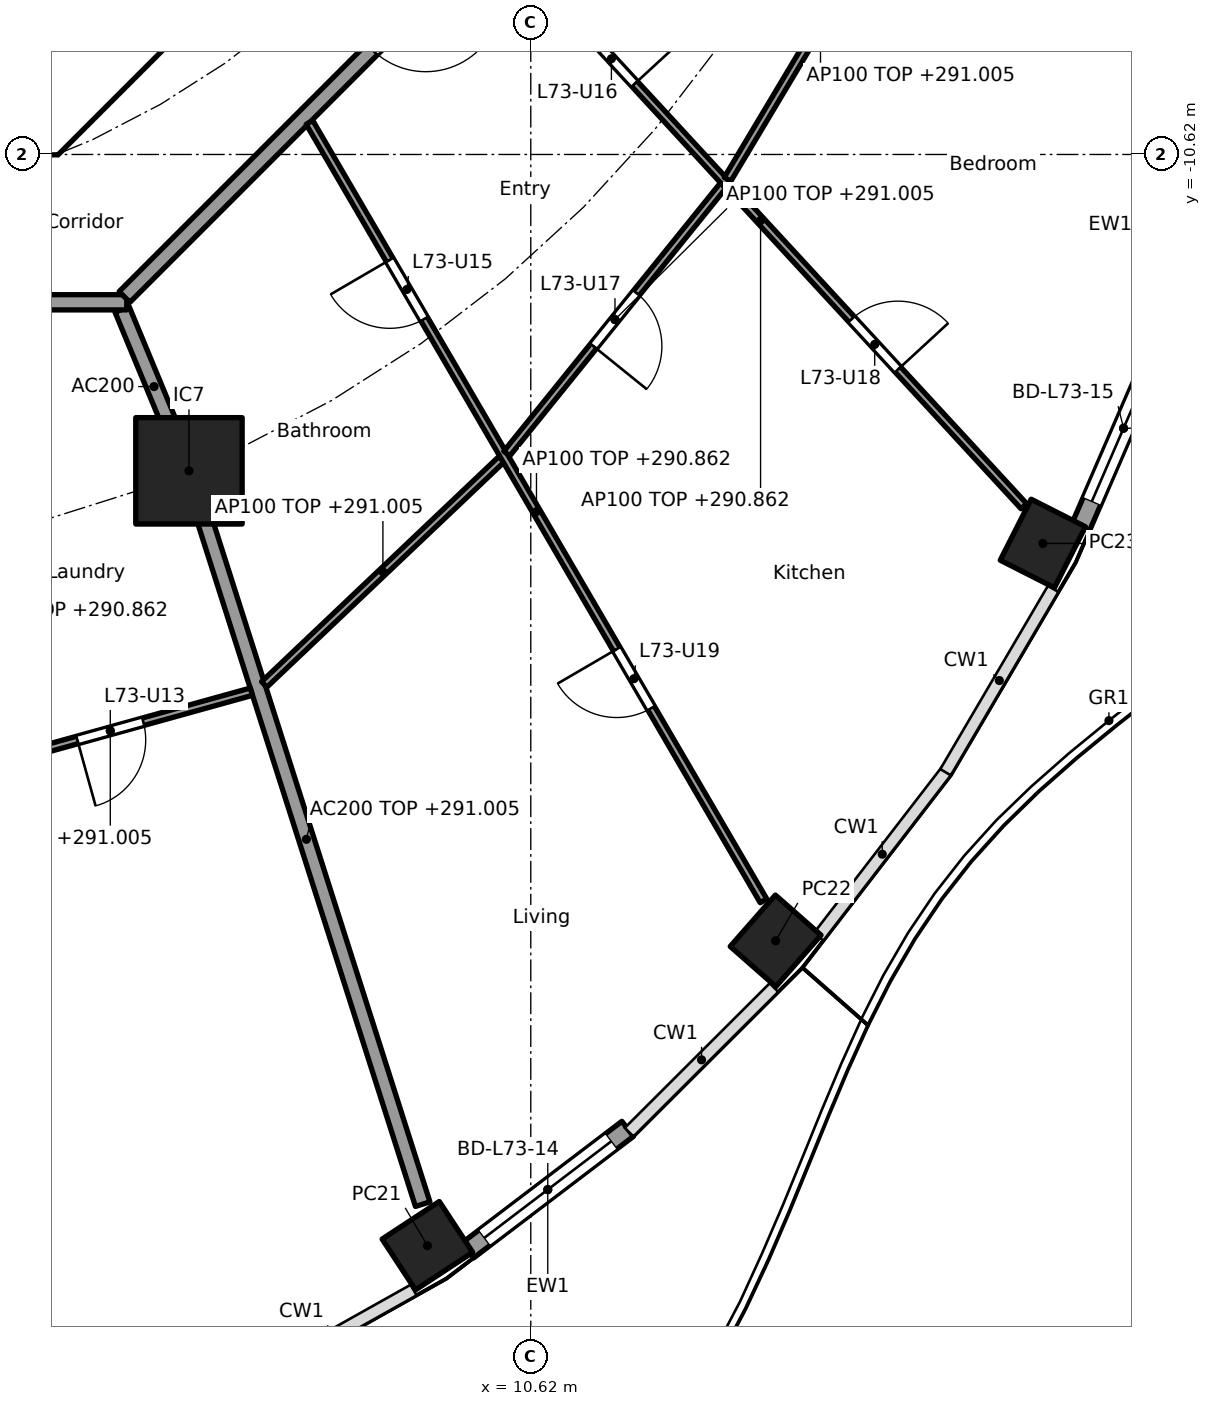
"""IFC4 building model, lengths in metres.
Left out: names, types, materials, properties, quantities, classifications, styles, units other than length and angle.
Written with IfcOpenShell. Run it as: python <this file> out.ifc"""

import sys

from ifc_helpers import new_model, si_unit, direction, frame, frame_2d, origin, origin_2d, place, context, subcontext, project, spatial, polyline, rectangle, hollow_rectangle, outline, extrude, element, fill, save


model = new_model("IFC4")
c1 = context("Model", 3, precision=1e-05, world=origin(), true_north=direction((0.0, 1.0)))
c2 = subcontext(c1, "Body", "Model", "MODEL_VIEW")
j1 = project(units=[si_unit("LENGTHUNIT", "METRE"), si_unit("PLANEANGLEUNIT", "RADIAN")], contexts=[c1])
p1 = place(None, origin())
s1 = spatial("IfcSite", under=j1, at=p1, CompositionType="ELEMENT")
p2 = place(p1, origin())
s2 = spatial("IfcBuilding", under=s1, at=p2, CompositionType="ELEMENT")
p3 = place(p2, frame((0.0, 0.0, 288.1)))
s3 = spatial("IfcBuildingStorey", under=s2, at=p3, CompositionType="ELEMENT", Elevation=288.1)
for number, where, z_axis, x_axis in (
    (1, (9.26, -24.976, 0.0), (0.0, 0.0, 1.0), (0.836, 0.549, 0.0)),
    (2, (13.841, -20.965, 0.0), (0.0, 0.0, 1.0), (0.66, 0.751, 0.0)),
    (3, (17.356, -15.738, 0.0), (0.0, 0.0, 1.0), (0.452, 0.892, 0.0)),
):
    element("IfcColumn", number, at=place(p3, frame(where, z_axis=z_axis, x_axis=x_axis)), inside=s3, PredefinedType="COLUMN", context=c2, shape_type="SweptSolid", body=[
        extrude(hollow_rectangle(XDim=0.9, YDim=0.8, WallThickness=0.028, at=origin_2d()), origin(), (0.0, 0.0, 1.0), 3.7),
    ])
p4 = place(p3, frame((6.123, -14.782, 0.0), z_axis=(0.0, 0.0, 1.0), x_axis=(1.0, 0.0, 0.0)))
e4 = element("IfcColumn", 4, at=p4, inside=s3, PredefinedType="COLUMN", context=c2, shape_type="SweptSolid", body=[
    extrude(rectangle(XDim=1.4, YDim=1.4, at=origin_2d()), origin(), (0.0, 0.0, 1.0), 3.7),
])
p5 = place(p3, frame((11.895, -23.439, 0.0), z_axis=(0.0, 0.0, 1.0), x_axis=(-0.796055284084, -0.605223912847, 0.0)))
e5 = element("IfcWall", 5, at=p5, inside=s3, PredefinedType="SOLIDWALL", context=c2, shape_type="SweptSolid", body=[
    extrude(rectangle(XDim=2.641, YDim=0.25, at=frame_2d((1.32, 0.0))), origin(), (0.0, 0.0, 1.0), 3.44),
])
p6 = place(p5, frame((0.27, 0.0, 0.0)))
e6 = element("IfcOpeningElement", 6, at=p6, cuts=e5, PredefinedType="OPENING", context=c2, shape_type="SweptSolid", body=[
    extrude(rectangle(XDim=2.1, YDim=2.4, at=frame_2d((1.05, 1.2))), frame((0.0, 0.135, 0.0), z_axis=(0.0, -1.0, 0.0), x_axis=(1.0, 0.0, 0.0)), (0.0, 0.0, 1.0), 0.27),
])
p7 = place(p3, frame((18.983, -12.918, 0.0), z_axis=(0.0, 0.0, 1.0), x_axis=(-0.397597791596, -0.9175598052, 0.0)))
e7 = element("IfcWall", 7, at=p7, inside=s3, PredefinedType="SOLIDWALL", context=c2, shape_type="SweptSolid", body=[
    extrude(rectangle(XDim=2.841, YDim=0.25, at=frame_2d((1.42, 0.0))), origin(), (0.0, 0.0, 1.0), 3.44),
])
p8 = place(p7, frame((0.371, 0.0, 0.0)))
e8 = element("IfcOpeningElement", 8, at=p8, cuts=e7, PredefinedType="OPENING", context=c2, shape_type="SweptSolid", body=[
    extrude(rectangle(XDim=2.1, YDim=2.4, at=frame_2d((1.05, 1.2))), frame((0.0, 0.135, 0.0), z_axis=(0.0, -1.0, 0.0), x_axis=(1.0, 0.0, 0.0)), (0.0, 0.0, 1.0), 0.27),
])
p9 = place(p3, frame((4.613, -9.988, 0.0), z_axis=(0.0, 0.0, 1.0), x_axis=(0.707106781187, 0.707106781187, 0.0)))
e9 = element("IfcWall", 9, at=p9, inside=s3, PredefinedType="SHEAR", context=c2, shape_type="SweptSolid", body=[
    extrude(rectangle(XDim=7.602, YDim=0.6, at=frame_2d((3.801, 0.0))), origin(), (0.0, 0.0, 1.0), 3.44),
])
p10 = place(p9, frame((3.201, 0.0, 0.0)))
e10 = element("IfcOpeningElement", 10, at=p10, cuts=e9, PredefinedType="OPENING", context=c2, shape_type="SweptSolid", body=[
    extrude(rectangle(XDim=1.2, YDim=2.1, at=frame_2d((0.6, 1.05))), frame((0.0, 0.31, 0.0), z_axis=(0.0, -1.0, 0.0), x_axis=(1.0, 0.0, 0.0)), (0.0, 0.0, 1.0), 0.62),
])
p11 = place(p3, origin())
e11 = element("IfcWall", 11, at=p11, inside=s3, PredefinedType="SHEAR", context=c2, shape_type="SweptSolid", body=[
    extrude(outline(polyline([(-4.152, -10.025), (4.152, -10.025), (4.401, -9.776), (4.825, -10.2), (4.401, -10.625), (-4.401, -10.625), (-4.825, -10.2), (-4.401, -9.776), (-4.152, -10.025)])), origin(), (0.0, 0.0, 1.0), 3.44),
])
p12 = place(p3, frame((5.243, -12.657, 0.0), z_axis=(0.0, 0.0, 1.0), x_axis=(0.382707856524, -0.923869415315, 0.0)))
e12 = element("IfcWall", 12, at=p12, inside=s3, PredefinedType="PARTITIONING", context=c2, shape_type="SweptSolid", body=[
    extrude(rectangle(XDim=2.2, YDim=0.2, at=frame_2d((1.1, 0.0))), origin(), (0.0, 0.0, 1.0), 3.44),
])
p13 = place(p3, frame((6.138, -14.83, 0.0), z_axis=(0.0, 0.0, 1.0), x_axis=(0.303653679037, -0.952782474234, 0.0)))
e13 = element("IfcWall", 13, at=p13, inside=s3, PredefinedType="PARTITIONING", context=c2, shape_type="SweptSolid", body=[
    extrude(rectangle(XDim=10.076, YDim=0.2, at=frame_2d((5.038, 0.0))), origin(), (0.0, 0.0, 1.0), 2.905),
])
p14 = place(p3, frame((14.823, -6.151, 0.0), z_axis=(0.0, 0.0, 1.0), x_axis=(0.821435065081, -0.570302054928, 0.0)))
e14 = element("IfcWall", 14, at=p14, inside=s3, PredefinedType="PARTITIONING", context=c2, shape_type="SweptSolid", body=[
    extrude(rectangle(XDim=5.368, YDim=0.2, at=frame_2d((2.684, 0.0))), origin(), (0.0, 0.0, 1.0), 3.44),
])
p15 = place(p3, frame((-5.104, -12.565, 0.0), z_axis=(0.0, 0.0, 1.0), x_axis=(1.0, 0.0, 0.0)))
e15 = element("IfcWall", 15, at=p15, inside=s3, PredefinedType="PARTITIONING", context=c2, shape_type="SweptSolid", body=[
    extrude(rectangle(XDim=10.409, YDim=0.2, at=frame_2d((5.205, 0.0))), origin(), (0.0, 0.0, 1.0), 3.44),
])
p16 = place(p15, frame((3.303, 0.0, 0.0)))
e16 = element("IfcOpeningElement", 16, at=p16, cuts=e15, PredefinedType="OPENING", context=c2, shape_type="SweptSolid", body=[
    extrude(rectangle(XDim=1.0, YDim=2.1, at=frame_2d((0.5, 1.05))), frame((0.0, 0.11, 0.0), z_axis=(0.0, -1.0, 0.0), x_axis=(1.0, 0.0, 0.0)), (0.0, 0.0, 1.0), 0.22),
])
p17 = place(p3, frame((5.275, -12.494, 0.0), z_axis=(0.0, 0.0, 1.0), x_axis=(0.707106781187, 0.707106781187, 0.0)))
e17 = element("IfcWall", 17, at=p17, inside=s3, PredefinedType="PARTITIONING", context=c2, shape_type="SweptSolid", body=[
    extrude(rectangle(XDim=10.409, YDim=0.2, at=frame_2d((5.205, 0.0))), origin(), (0.0, 0.0, 1.0), 3.44),
])
p18 = place(p17, frame((4.604, 0.0, 0.0)))
e18 = element("IfcOpeningElement", 18, at=p18, cuts=e17, PredefinedType="OPENING", context=c2, shape_type="SweptSolid", body=[
    extrude(rectangle(XDim=1.0, YDim=2.1, at=frame_2d((0.5, 1.05))), frame((0.0, 0.11, 0.0), z_axis=(0.0, -1.0, 0.0), x_axis=(1.0, 0.0, 0.0)), (0.0, 0.0, 1.0), 0.22),
])
p19 = place(p3, frame((3.231, -18.718, 0.0), z_axis=(0.0, 0.0, 1.0), x_axis=(0.963606817151, 0.267323590318, 0.0)))
e19 = element("IfcWall", 19, at=p19, inside=s3, PredefinedType="PARTITIONING", context=c2, shape_type="SweptSolid", body=[
    extrude(rectangle(XDim=3.853, YDim=0.1, at=frame_2d((1.927, 0.0))), origin(), (0.0, 0.0, 1.0), 2.905),
])
p20 = place(p19, frame((1.477, 0.0, 0.0)))
e20 = element("IfcOpeningElement", 20, at=p20, cuts=e19, PredefinedType="OPENING", context=c2, shape_type="SweptSolid", body=[
    extrude(rectangle(XDim=0.9, YDim=2.1, at=frame_2d((0.45, 1.05))), frame((0.0, 0.06, 0.0), z_axis=(0.0, -1.0, 0.0), x_axis=(1.0, 0.0, 0.0)), (0.0, 0.0, 1.0), 0.12),
])
p21 = place(p3, frame((7.113, -17.592, 0.0), z_axis=(0.0, 0.0, 1.0), x_axis=(0.725433932329, 0.688291805723, 0.0)))
e21 = element("IfcWall", 21, at=p21, inside=s3, PredefinedType="PARTITIONING", context=c2, shape_type="SweptSolid", body=[
    extrude(rectangle(XDim=4.305, YDim=0.1, at=frame_2d((2.153, 0.0))), origin(), (0.0, 0.0, 1.0), 2.905),
])
p22 = place(p3, frame((7.708, -10.198, 0.0), z_axis=(0.0, 0.0, 1.0), x_axis=(0.503839015963, -0.863797572347, 0.0)))
e22 = element("IfcWall", 22, at=p22, inside=s3, PredefinedType="PARTITIONING", context=c2, shape_type="SweptSolid", body=[
    extrude(rectangle(XDim=11.856, YDim=0.1, at=frame_2d((5.928, 0.0))), origin(), (0.0, 0.0, 1.0), 2.762),
])
p23 = place(p22, frame((2.095, 0.0, 0.0)))
e23 = element("IfcOpeningElement", 23, at=p23, cuts=e22, PredefinedType="OPENING", context=c2, shape_type="SweptSolid", body=[
    extrude(rectangle(XDim=0.9, YDim=2.1, at=frame_2d((0.45, 1.05))), frame((0.0, 0.06, 0.0), z_axis=(0.0, -1.0, 0.0), x_axis=(1.0, 0.0, 0.0)), (0.0, 0.0, 1.0), 0.12),
])
p24 = place(p22, frame((8.023, 0.0, 0.0)))
e24 = element("IfcOpeningElement", 24, at=p24, cuts=e22, PredefinedType="OPENING", context=c2, shape_type="SweptSolid", body=[
    extrude(rectangle(XDim=0.9, YDim=2.1, at=frame_2d((0.45, 1.05))), frame((0.0, 0.06, 0.0), z_axis=(0.0, -1.0, 0.0), x_axis=(1.0, 0.0, 0.0)), (0.0, 0.0, 1.0), 0.12),
])
p25 = place(p3, frame((10.304, -14.555, 0.0), z_axis=(0.0, 0.0, 1.0), x_axis=(0.628170338674, 0.778075848237, 0.0)))
e25 = element("IfcWall", 25, at=p25, inside=s3, PredefinedType="PARTITIONING", context=c2, shape_type="SweptSolid", body=[
    extrude(rectangle(XDim=4.532, YDim=0.1, at=frame_2d((2.266, 0.0))), origin(), (0.0, 0.0, 1.0), 2.905),
])
p26 = place(p25, frame((1.816, 0.0, 0.0)))
e26 = element("IfcOpeningElement", 26, at=p26, cuts=e25, PredefinedType="OPENING", context=c2, shape_type="SweptSolid", body=[
    extrude(rectangle(XDim=0.9, YDim=2.1, at=frame_2d((0.45, 1.05))), frame((0.0, 0.06, 0.0), z_axis=(0.0, -1.0, 0.0), x_axis=(1.0, 0.0, 0.0)), (0.0, 0.0, 1.0), 0.12),
])
p27 = place(p3, frame((10.179, -7.731, 0.0), z_axis=(0.0, 0.0, 1.0), x_axis=(0.67775318564, -0.73528947997, 0.0)))
e27 = element("IfcWall", 27, at=p27, inside=s3, PredefinedType="PARTITIONING", context=c2, shape_type="SweptSolid", body=[
    extrude(rectangle(XDim=10.222, YDim=0.1, at=frame_2d((5.111, 0.0))), origin(), (0.0, 0.0, 1.0), 2.762),
])
p28 = place(p27, frame((1.766, 0.0, 0.0)))
e28 = element("IfcOpeningElement", 28, at=p28, cuts=e27, PredefinedType="OPENING", context=c2, shape_type="SweptSolid", body=[
    extrude(rectangle(XDim=0.9, YDim=2.1, at=frame_2d((0.45, 1.05))), frame((0.0, 0.06, 0.0), z_axis=(0.0, -1.0, 0.0), x_axis=(1.0, 0.0, 0.0)), (0.0, 0.0, 1.0), 0.12),
])
p29 = place(p27, frame((6.877, 0.0, 0.0)))
e29 = element("IfcOpeningElement", 29, at=p29, cuts=e27, PredefinedType="OPENING", context=c2, shape_type="SweptSolid", body=[
    extrude(rectangle(XDim=0.9, YDim=2.1, at=frame_2d((0.45, 1.05))), frame((0.0, 0.06, 0.0), z_axis=(0.0, -1.0, 0.0), x_axis=(1.0, 0.0, 0.0)), (0.0, 0.0, 1.0), 0.12),
])
p30 = place(p3, frame((13.208, -10.947, 0.0), z_axis=(0.0, 0.0, 1.0), x_axis=(0.512726452516, 0.858552028063, 0.0)))
e30 = element("IfcWall", 30, at=p30, inside=s3, PredefinedType="PARTITIONING", context=c2, shape_type="SweptSolid", body=[
    extrude(rectangle(XDim=4.772, YDim=0.1, at=frame_2d((2.386, 0.0))), origin(), (0.0, 0.0, 1.0), 2.905),
])
p31 = place(p6, origin())
e31 = element("IfcDoor", 31, at=p31, inside=s3, OperationType="SLIDING_TO_LEFT", PredefinedType="DOOR", context=c2, shape_type="SweptSolid", body=[
    extrude(rectangle(XDim=2.1, YDim=2.4, at=frame_2d((1.05, 1.2))), frame((0.0, 0.025, 0.0), z_axis=(0.0, -1.0, 0.0), x_axis=(1.0, 0.0, 0.0)), (0.0, 0.0, 1.0), 0.05),
])
fill(e6, e31)
p32 = place(p8, origin())
e32 = element("IfcDoor", 32, at=p32, inside=s3, OperationType="SLIDING_TO_LEFT", PredefinedType="DOOR", context=c2, shape_type="SweptSolid", body=[
    extrude(rectangle(XDim=2.1, YDim=2.4, at=frame_2d((1.05, 1.2))), frame((0.0, 0.025, 0.0), z_axis=(0.0, -1.0, 0.0), x_axis=(1.0, 0.0, 0.0)), (0.0, 0.0, 1.0), 0.05),
])
fill(e8, e32)
p33 = place(p20, frame((0.9, 0.0, 0.0), x_axis=(-1.0, 0.0, 0.0)))
e33 = element("IfcDoor", 33, at=p33, inside=s3, OperationType="SINGLE_SWING_RIGHT", PredefinedType="DOOR", context=c2, shape_type="SweptSolid", body=[
    extrude(rectangle(XDim=0.9, YDim=2.1, at=frame_2d((0.45, 1.05))), frame((0.0, 0.025, 0.0), z_axis=(0.0, -1.0, 0.0), x_axis=(1.0, 0.0, 0.0)), (0.0, 0.0, 1.0), 0.05),
])
fill(e20, e33)
p34 = place(p23, frame((0.9, 0.0, 0.0), x_axis=(-1.0, 0.0, 0.0)))
e34 = element("IfcDoor", 34, at=p34, inside=s3, OperationType="SINGLE_SWING_RIGHT", PredefinedType="DOOR", context=c2, shape_type="SweptSolid", body=[
    extrude(rectangle(XDim=0.9, YDim=2.1, at=frame_2d((0.45, 1.05))), frame((0.0, 0.025, 0.0), z_axis=(0.0, -1.0, 0.0), x_axis=(1.0, 0.0, 0.0)), (0.0, 0.0, 1.0), 0.05),
])
fill(e23, e34)
p35 = place(p28, origin())
e35 = element("IfcDoor", 35, at=p35, inside=s3, OperationType="SINGLE_SWING_RIGHT", PredefinedType="DOOR", context=c2, shape_type="SweptSolid", body=[
    extrude(rectangle(XDim=0.9, YDim=2.1, at=frame_2d((0.45, 1.05))), frame((0.0, 0.025, 0.0), z_axis=(0.0, -1.0, 0.0), x_axis=(1.0, 0.0, 0.0)), (0.0, 0.0, 1.0), 0.05),
])
fill(e28, e35)
p36 = place(p26, frame((0.9, 0.0, 0.0), x_axis=(-1.0, 0.0, 0.0)))
e36 = element("IfcDoor", 36, at=p36, inside=s3, OperationType="SINGLE_SWING_RIGHT", PredefinedType="DOOR", context=c2, shape_type="SweptSolid", body=[
    extrude(rectangle(XDim=0.9, YDim=2.1, at=frame_2d((0.45, 1.05))), frame((0.0, 0.025, 0.0), z_axis=(0.0, -1.0, 0.0), x_axis=(1.0, 0.0, 0.0)), (0.0, 0.0, 1.0), 0.05),
])
fill(e26, e36)
p37 = place(p29, origin())
e37 = element("IfcDoor", 37, at=p37, inside=s3, OperationType="SINGLE_SWING_RIGHT", PredefinedType="DOOR", context=c2, shape_type="SweptSolid", body=[
    extrude(rectangle(XDim=0.9, YDim=2.1, at=frame_2d((0.45, 1.05))), frame((0.0, 0.025, 0.0), z_axis=(0.0, -1.0, 0.0), x_axis=(1.0, 0.0, 0.0)), (0.0, 0.0, 1.0), 0.05),
])
fill(e29, e37)
p38 = place(p24, frame((0.9, 0.0, 0.0), x_axis=(-1.0, 0.0, 0.0)))
e38 = element("IfcDoor", 38, at=p38, inside=s3, OperationType="SINGLE_SWING_RIGHT", PredefinedType="DOOR", context=c2, shape_type="SweptSolid", body=[
    extrude(rectangle(XDim=0.9, YDim=2.1, at=frame_2d((0.45, 1.05))), frame((0.0, 0.025, 0.0), z_axis=(0.0, -1.0, 0.0), x_axis=(1.0, 0.0, 0.0)), (0.0, 0.0, 1.0), 0.05),
])
fill(e24, e38)
save(model, sys.argv[1])
